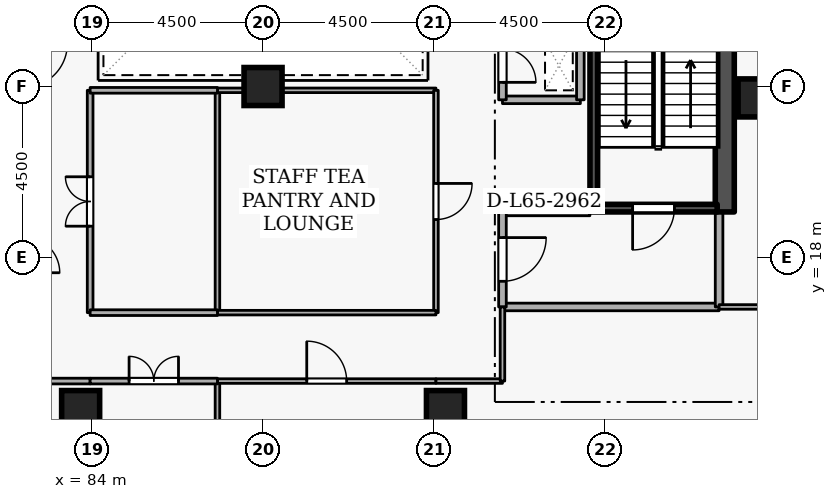
"""IFC4 building model, lengths in metres.
Left out: names, types, materials, properties, quantities, classifications, styles, units other than length and angle.
Written with IfcOpenShell. Run it as: python <this file> out.ifc"""

import sys

from ifc_helpers import new_model, si_unit, direction, frame, frame_2d, origin, origin_2d, place, context, subcontext, project, spatial, rectangle, extrude, element, fill, save


model = new_model("IFC4")
c1 = context("Model", 3, precision=1e-05, world=origin(), true_north=direction((0.0, 1.0)))
c2 = subcontext(c1, "Body", "Model", "MODEL_VIEW")
j1 = project(units=[si_unit("LENGTHUNIT", "METRE"), si_unit("PLANEANGLEUNIT", "RADIAN")], contexts=[c1])
p1 = place(None, origin())
s1 = spatial("IfcSite", under=j1, at=p1, CompositionType="ELEMENT")
p2 = place(p1, origin())
s2 = spatial("IfcBuilding", under=s1, at=p2, CompositionType="ELEMENT")
p3 = place(p2, frame((0.0, 0.0, 243.9)))
s3 = spatial("IfcBuildingStorey", under=s2, at=p3, CompositionType="ELEMENT", Elevation=243.9)
p4 = place(p3, frame((100.65, 19.2, 0.0), z_axis=(0.0, 0.0, 1.0), x_axis=(0.0, 1.0, 0.0)))
e1 = element("IfcWall", 1, at=p4, inside=s3, PredefinedType="SHEAR", context=c2, shape_type="SweptSolid", body=[
    extrude(rectangle(XDim=15.6, YDim=0.5, at=frame_2d((7.8, 0.0))), origin(), (0.0, 0.0, 1.0), 3.6),
])
for number, where, z_axis, x_axis in (
    (2, (93.3, 14.0, 0.0), (0.0, 0.0, 1.0), (1.0, 0.0, 0.0)),
    (3, (83.7, 14.0, 0.0), (0.0, 0.0, 1.0), (1.0, 0.0, 0.0)),
    (4, (101.5, 22.2, 0.0), (0.0, 0.0, 1.0), (1.0, 0.0, 0.0)),
    (5, (88.5, 22.5, 0.0), (0.0, 0.0, 1.0), (1.0, 0.0, 0.0)),
):
    element("IfcColumn", number, at=place(p3, frame(where, z_axis=z_axis, x_axis=x_axis)), inside=s3, PredefinedType="COLUMN", context=c2, shape_type="SweptSolid", body=[
        extrude(rectangle(XDim=1.0, YDim=1.0, at=origin_2d()), origin(), (0.0, 0.0, 1.0), 3.6),
    ])
p5 = place(p3, frame((100.45, 19.3, 0.0), z_axis=(0.0, 0.0, 1.0), x_axis=(-1.0, 0.0, 0.0)))
e6 = element("IfcWall", 6, at=p5, inside=s3, PredefinedType="SHEAR", context=c2, shape_type="SweptSolid", body=[
    extrude(rectangle(XDim=3.35, YDim=0.2, at=frame_2d((1.675, 0.0))), origin(), (0.0, 0.0, 1.0), 3.6),
])
p6 = place(p5, frame((1.125, 0.0, 0.0)))
e7 = element("IfcOpeningElement", 7, at=p6, cuts=e6, PredefinedType="OPENING", context=c2, shape_type="SweptSolid", body=[
    extrude(rectangle(XDim=1.1, YDim=2.1, at=frame_2d((0.55, 1.05))), frame((0.0, 0.11, 0.0), z_axis=(0.0, -1.0, 0.0), x_axis=(1.0, 0.0, 0.0)), (0.0, 0.0, 1.0), 0.22),
])
p7 = place(p3, frame((97.203, 26.55, 0.0), z_axis=(0.0, 0.0, 1.0), x_axis=(0.0, -1.0, 0.0)))
e8 = element("IfcWall", 8, at=p7, inside=s3, PredefinedType="SHEAR", context=c2, shape_type="SweptSolid", body=[
    extrude(rectangle(XDim=7.1, YDim=0.2, at=frame_2d((3.55, 0.0))), origin(), (0.0, 0.0, 1.0), 3.6),
])
p8 = place(p3, frame((94.8, 16.7, 0.0), z_axis=(0.0, 0.0, 1.0), x_axis=(1.0, 0.0, 0.0)))
e9 = element("IfcWall", 9, at=p8, inside=s3, PredefinedType="STANDARD", context=c2, shape_type="SweptSolid", body=[
    extrude(rectangle(XDim=5.7, YDim=0.2, at=frame_2d((2.85, 0.0))), origin(), (0.0, 0.0, 1.0), 3.34),
])
p9 = place(p3, frame((100.5, 16.7, 0.0), z_axis=(0.0, 0.0, 1.0), x_axis=(0.0, 1.0, 0.0)))
e10 = element("IfcWall", 10, at=p9, inside=s3, PredefinedType="STANDARD", context=c2, shape_type="SweptSolid", body=[
    extrude(rectangle(XDim=2.5, YDim=0.2, at=frame_2d((1.25, 0.0))), origin(), (0.0, 0.0, 1.0), 3.34),
])
p10 = place(p3, frame((97.1, 19.2, 0.0), z_axis=(0.0, 0.0, 1.0), x_axis=(-1.0, 0.0, 0.0)))
e11 = element("IfcWall", 11, at=p10, inside=s3, PredefinedType="STANDARD", context=c2, shape_type="SweptSolid", body=[
    extrude(rectangle(XDim=2.3, YDim=0.2, at=frame_2d((1.15, 0.0))), origin(), (0.0, 0.0, 1.0), 2.545),
])
p11 = place(p3, frame((94.8, 19.2, 0.0), z_axis=(0.0, 0.0, 1.0), x_axis=(0.0, -1.0, 0.0)))
e12 = element("IfcWall", 12, at=p11, inside=s3, PredefinedType="STANDARD", context=c2, shape_type="SweptSolid", body=[
    extrude(rectangle(XDim=2.5, YDim=0.2, at=frame_2d((1.25, 0.0))), origin(), (0.0, 0.0, 1.0), 3.34),
])
p12 = place(p11, frame((0.675, 0.0, 0.0)))
e13 = element("IfcOpeningElement", 13, at=p12, cuts=e12, PredefinedType="OPENING", context=c2, shape_type="SweptSolid", body=[
    extrude(rectangle(XDim=1.15, YDim=2.1, at=frame_2d((0.575, 1.05))), frame((0.0, 0.11, 0.0), z_axis=(0.0, -1.0, 0.0), x_axis=(1.0, 0.0, 0.0)), (0.0, 0.0, 1.0), 0.22),
])
p13 = place(p3, frame((94.8, 22.15, 0.0), z_axis=(0.0, 0.0, 1.0), x_axis=(1.0, 0.0, 0.0)))
e14 = element("IfcWall", 14, at=p13, inside=s3, PredefinedType="STANDARD", context=c2, shape_type="SweptSolid", body=[
    extrude(rectangle(XDim=2.05, YDim=0.2, at=frame_2d((1.025, 0.0))), origin(), (0.0, 0.0, 1.0), 3.34),
])
p14 = place(p3, frame((96.85, 22.15, 0.0), z_axis=(0.0, 0.0, 1.0), x_axis=(0.0, 1.0, 0.0)))
e15 = element("IfcWall", 15, at=p14, inside=s3, PredefinedType="STANDARD", context=c2, shape_type="SweptSolid", body=[
    extrude(rectangle(XDim=1.8, YDim=0.2, at=frame_2d((0.9, 0.0))), origin(), (0.0, 0.0, 1.0), 3.34),
])
p15 = place(p3, frame((94.8, 23.95, 0.0), z_axis=(0.0, 0.0, 1.0), x_axis=(0.0, -1.0, 0.0)))
e16 = element("IfcWall", 16, at=p15, inside=s3, PredefinedType="STANDARD", context=c2, shape_type="SweptSolid", body=[
    extrude(rectangle(XDim=1.8, YDim=0.2, at=frame_2d((0.9, 0.0))), origin(), (0.0, 0.0, 1.0), 3.34),
])
p16 = place(p15, frame((0.46, 0.0, 0.0)))
e17 = element("IfcOpeningElement", 17, at=p16, cuts=e16, PredefinedType="OPENING", context=c2, shape_type="SweptSolid", body=[
    extrude(rectangle(XDim=0.88, YDim=2.04, at=frame_2d((0.44, 1.02))), frame((0.0, 0.11, 0.0), z_axis=(0.0, -1.0, 0.0), x_axis=(1.0, 0.0, 0.0)), (0.0, 0.0, 1.0), 0.22),
])
p17 = place(p3, frame((87.3, 3.28, 0.0), z_axis=(0.0, 0.0, 1.0), x_axis=(0.0, 1.0, 0.0)))
e18 = element("IfcWall", 18, at=p17, inside=s3, PredefinedType="PARTITIONING", context=c2, shape_type="SweptSolid", body=[
    extrude(rectangle(XDim=11.47, YDim=0.12, at=frame_2d((5.735, 0.0))), origin(), (0.0, 0.0, 1.0), 3.34),
])
p18 = place(p3, frame((87.3, 14.75, 0.0), z_axis=(0.0, 0.0, 1.0), x_axis=(1.0, 0.0, 0.0)))
e19 = element("IfcWall", 19, at=p18, inside=s3, PredefinedType="PARTITIONING", context=c2, shape_type="SweptSolid", body=[
    extrude(rectangle(XDim=5.75, YDim=0.12, at=frame_2d((2.875, 0.0))), origin(), (0.0, 0.0, 1.0), 3.34),
])
p19 = place(p18, frame((2.35, 0.0, 0.0)))
e20 = element("IfcOpeningElement", 20, at=p19, cuts=e19, PredefinedType="OPENING", context=c2, shape_type="SweptSolid", body=[
    extrude(rectangle(XDim=1.05, YDim=2.1, at=frame_2d((0.525, 1.05))), frame((0.0, 0.07, 0.0), z_axis=(0.0, -1.0, 0.0), x_axis=(1.0, 0.0, 0.0)), (0.0, 0.0, 1.0), 0.14),
])
p20 = place(p3, frame((93.05, 14.75, 0.0), z_axis=(0.0, 0.0, 1.0), x_axis=(1.0, 0.0, 0.0)))
e21 = element("IfcWall", 21, at=p20, inside=s3, PredefinedType="PARTITIONING", context=c2, shape_type="SweptSolid", body=[
    extrude(rectangle(XDim=1.75, YDim=0.12, at=frame_2d((0.875, 0.0))), origin(), (0.0, 0.0, 1.0), 3.34),
])
p21 = place(p3, frame((94.8, 14.75, 0.0), z_axis=(0.0, 0.0, 1.0), x_axis=(0.0, 1.0, 0.0)))
e22 = element("IfcWall", 22, at=p21, inside=s3, PredefinedType="PARTITIONING", context=c2, shape_type="SweptSolid", body=[
    extrude(rectangle(XDim=1.95, YDim=0.12, at=frame_2d((0.975, 0.0))), origin(), (0.0, 0.0, 1.0), 3.34),
])
p22 = place(p3, frame((100.5, 16.7, 0.0), z_axis=(0.0, 0.0, 1.0), x_axis=(1.0, 0.0, 0.0)))
e23 = element("IfcWall", 23, at=p22, inside=s3, PredefinedType="PARTITIONING", context=c2, shape_type="SweptSolid", body=[
    extrude(rectangle(XDim=11.72, YDim=0.12, at=frame_2d((5.86, 0.0))), origin(), (0.0, 0.0, 1.0), 3.34),
])
p23 = place(p3, frame((82.2, 14.75, 0.0), z_axis=(0.0, 0.0, 1.0), x_axis=(1.0, 0.0, 0.0)))
e24 = element("IfcWall", 24, at=p23, inside=s3, PredefinedType="PARTITIONING", context=c2, shape_type="SweptSolid", body=[
    extrude(rectangle(XDim=1.75, YDim=0.15, at=frame_2d((0.875, 0.0))), origin(), (0.0, 0.0, 1.0), 3.34),
])
p24 = place(p3, frame((83.95, 14.75, 0.0), z_axis=(0.0, 0.0, 1.0), x_axis=(1.0, 0.0, 0.0)))
e25 = element("IfcWall", 25, at=p24, inside=s3, PredefinedType="PARTITIONING", context=c2, shape_type="SweptSolid", body=[
    extrude(rectangle(XDim=3.35, YDim=0.15, at=frame_2d((1.675, 0.0))), origin(), (0.0, 0.0, 1.0), 3.34),
])
p25 = place(p24, frame((1.025, 0.0, 0.0)))
e26 = element("IfcOpeningElement", 26, at=p25, cuts=e25, PredefinedType="OPENING", context=c2, shape_type="SweptSolid", body=[
    extrude(rectangle(XDim=1.3, YDim=2.12, at=frame_2d((0.65, 1.06))), frame((0.0, 0.085, 0.0), z_axis=(0.0, -1.0, 0.0), x_axis=(1.0, 0.0, 0.0)), (0.0, 0.0, 1.0), 0.17),
])
p26 = place(p3, frame((87.3, 16.55, 0.0), z_axis=(0.0, 0.0, 1.0), x_axis=(0.0, 1.0, 0.0)))
e27 = element("IfcWall", 27, at=p26, inside=s3, PredefinedType="PARTITIONING", context=c2, shape_type="SweptSolid", body=[
    extrude(rectangle(XDim=5.85, YDim=0.12, at=frame_2d((2.925, 0.0))), origin(), (0.0, 0.0, 1.0), 3.34),
])
p27 = place(p3, frame((87.3, 22.4, 0.0), z_axis=(0.0, 0.0, 1.0), x_axis=(1.0, 0.0, 0.0)))
e28 = element("IfcWall", 28, at=p27, inside=s3, PredefinedType="PARTITIONING", context=c2, shape_type="SweptSolid", body=[
    extrude(rectangle(XDim=5.75, YDim=0.12, at=frame_2d((2.875, 0.0))), origin(), (0.0, 0.0, 1.0), 3.34),
])
p28 = place(p3, frame((93.05, 22.4, 0.0), z_axis=(0.0, 0.0, 1.0), x_axis=(0.0, -1.0, 0.0)))
e29 = element("IfcWall", 29, at=p28, inside=s3, PredefinedType="PARTITIONING", context=c2, shape_type="SweptSolid", body=[
    extrude(rectangle(XDim=5.85, YDim=0.12, at=frame_2d((2.925, 0.0))), origin(), (0.0, 0.0, 1.0), 3.34),
])
p29 = place(p28, frame((2.45, 0.0, 0.0)))
e30 = element("IfcOpeningElement", 30, at=p29, cuts=e29, PredefinedType="OPENING", context=c2, shape_type="SweptSolid", body=[
    extrude(rectangle(XDim=0.95, YDim=2.1, at=frame_2d((0.475, 1.05))), frame((0.0, 0.07, 0.0), z_axis=(0.0, -1.0, 0.0), x_axis=(1.0, 0.0, 0.0)), (0.0, 0.0, 1.0), 0.14),
])
p30 = place(p3, frame((93.05, 16.55, 0.0), z_axis=(0.0, 0.0, 1.0), x_axis=(-1.0, 0.0, 0.0)))
e31 = element("IfcWall", 31, at=p30, inside=s3, PredefinedType="PARTITIONING", context=c2, shape_type="SweptSolid", body=[
    extrude(rectangle(XDim=5.75, YDim=0.12, at=frame_2d((2.875, 0.0))), origin(), (0.0, 0.0, 1.0), 3.34),
])
p31 = place(p3, frame((83.95, 16.55, 0.0), z_axis=(0.0, 0.0, 1.0), x_axis=(0.0, 1.0, 0.0)))
e32 = element("IfcWall", 32, at=p31, inside=s3, PredefinedType="PARTITIONING", context=c2, shape_type="SweptSolid", body=[
    extrude(rectangle(XDim=5.85, YDim=0.15, at=frame_2d((2.925, 0.0))), origin(), (0.0, 0.0, 1.0), 3.34),
])
p32 = place(p31, frame((2.275, 0.0, 0.0)))
e33 = element("IfcOpeningElement", 33, at=p32, cuts=e32, PredefinedType="OPENING", context=c2, shape_type="SweptSolid", body=[
    extrude(rectangle(XDim=1.3, YDim=2.12, at=frame_2d((0.65, 1.06))), frame((0.0, 0.085, 0.0), z_axis=(0.0, -1.0, 0.0), x_axis=(1.0, 0.0, 0.0)), (0.0, 0.0, 1.0), 0.17),
])
for number, where, z_axis, x_axis in (
    (34, (83.95, 22.4, 0.0), (0.0, 0.0, 1.0), (1.0, 0.0, 0.0)),
    (35, (87.3, 16.55, 0.0), (0.0, 0.0, 1.0), (-1.0, 0.0, 0.0)),
):
    element("IfcWall", number, at=place(p3, frame(where, z_axis=z_axis, x_axis=x_axis)), inside=s3, PredefinedType="PARTITIONING", context=c2, shape_type="SweptSolid", body=[
        extrude(rectangle(XDim=3.35, YDim=0.15, at=frame_2d((1.675, 0.0))), origin(), (0.0, 0.0, 1.0), 3.34),
    ])
p33 = place(p6, origin())
e36 = element("IfcDoor", 36, at=p33, inside=s3, OperationType="SINGLE_SWING_RIGHT", PredefinedType="DOOR", context=c2, shape_type="SweptSolid", body=[
    extrude(rectangle(XDim=1.1, YDim=2.1, at=frame_2d((0.55, 1.05))), frame((0.0, 0.025, 0.0), z_axis=(0.0, -1.0, 0.0), x_axis=(1.0, 0.0, 0.0)), (0.0, 0.0, 1.0), 0.05),
])
fill(e7, e36)
p34 = place(p12, origin())
e37 = element("IfcDoor", 37, at=p34, inside=s3, OperationType="SINGLE_SWING_LEFT", PredefinedType="DOOR", context=c2, shape_type="SweptSolid", body=[
    extrude(rectangle(XDim=1.15, YDim=2.1, at=frame_2d((0.575, 1.05))), frame((0.0, 0.025, 0.0), z_axis=(0.0, -1.0, 0.0), x_axis=(1.0, 0.0, 0.0)), (0.0, 0.0, 1.0), 0.05),
])
fill(e13, e37)
p35 = place(p16, origin())
e38 = element("IfcDoor", 38, at=p35, inside=s3, OperationType="SINGLE_SWING_RIGHT", PredefinedType="DOOR", context=c2, shape_type="SweptSolid", body=[
    extrude(rectangle(XDim=0.88, YDim=2.04, at=frame_2d((0.44, 1.02))), frame((0.0, 0.025, 0.0), z_axis=(0.0, -1.0, 0.0), x_axis=(1.0, 0.0, 0.0)), (0.0, 0.0, 1.0), 0.05),
])
fill(e17, e38)
p36 = place(p19, origin())
e39 = element("IfcDoor", 39, at=p36, inside=s3, OperationType="SINGLE_SWING_LEFT", PredefinedType="DOOR", context=c2, shape_type="SweptSolid", body=[
    extrude(rectangle(XDim=1.05, YDim=2.1, at=frame_2d((0.525, 1.05))), frame((0.0, 0.025, 0.0), z_axis=(0.0, -1.0, 0.0), x_axis=(1.0, 0.0, 0.0)), (0.0, 0.0, 1.0), 0.05),
])
fill(e20, e39)
p37 = place(p25, origin())
e40 = element("IfcDoor", 40, at=p37, inside=s3, OperationType="DOUBLE_DOOR_SINGLE_SWING", PredefinedType="DOOR", context=c2, shape_type="SweptSolid", body=[
    extrude(rectangle(XDim=1.3, YDim=2.12, at=frame_2d((0.65, 1.06))), frame((0.0, 0.025, 0.0), z_axis=(0.0, -1.0, 0.0), x_axis=(1.0, 0.0, 0.0)), (0.0, 0.0, 1.0), 0.05),
])
fill(e26, e40)
p38 = place(p29, origin())
e41 = element("IfcDoor", 41, at=p38, inside=s3, OperationType="SINGLE_SWING_LEFT", PredefinedType="DOOR", context=c2, shape_type="SweptSolid", body=[
    extrude(rectangle(XDim=0.95, YDim=2.1, at=frame_2d((0.475, 1.05))), frame((0.0, 0.025, 0.0), z_axis=(0.0, -1.0, 0.0), x_axis=(1.0, 0.0, 0.0)), (0.0, 0.0, 1.0), 0.05),
])
fill(e30, e41)
p39 = place(p32, origin())
e42 = element("IfcDoor", 42, at=p39, inside=s3, OperationType="DOUBLE_DOOR_SINGLE_SWING", PredefinedType="DOOR", context=c2, shape_type="SweptSolid", body=[
    extrude(rectangle(XDim=1.3, YDim=2.12, at=frame_2d((0.65, 1.06))), frame((0.0, 0.025, 0.0), z_axis=(0.0, -1.0, 0.0), x_axis=(1.0, 0.0, 0.0)), (0.0, 0.0, 1.0), 0.05),
])
fill(e33, e42)
save(model, sys.argv[1])
